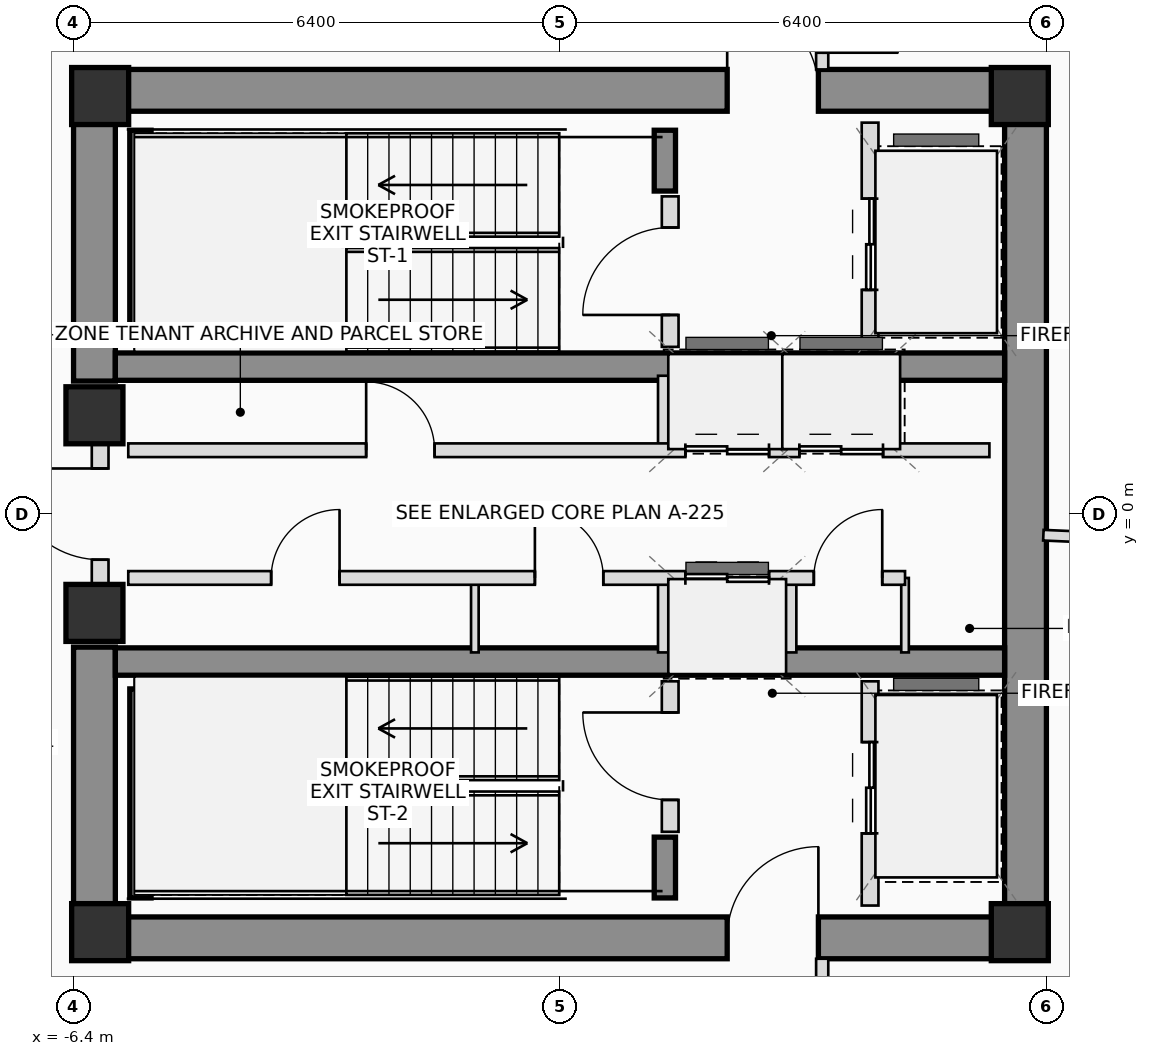
"""IFC4 building model, lengths in metres.
Left out: names, types, materials, properties, quantities, classifications, styles, units other than length and angle.
Written with IfcOpenShell. Run it as: python <this file> out.ifc"""

import sys

from ifc_helpers import new_model, si_unit, direction, frame, frame_2d, origin, origin_2d, place, context, subcontext, project, spatial, rectangle, extrude, source, transform, mapped, element, fill, save


model = new_model("IFC4")
c1 = context("Model", 3, precision=1e-05, world=origin(), true_north=direction((0.0, 1.0)))
c2 = subcontext(c1, "Body", "Model", "MODEL_VIEW")
j1 = project(units=[si_unit("LENGTHUNIT", "METRE"), si_unit("PLANEANGLEUNIT", "RADIAN")], contexts=[c1])
p1 = place(None, origin())
s1 = spatial("IfcSite", under=j1, at=p1, CompositionType="ELEMENT")
p2 = place(p1, origin())
s2 = spatial("IfcBuilding", under=s1, at=p2, CompositionType="ELEMENT")
p3 = place(p2, frame((0.0, 0.0, 274.55)))
s3 = spatial("IfcBuildingStorey", under=s2, at=p3, CompositionType="ELEMENT", Elevation=274.55)
m1 = source(origin(), c2, "Body", "SweptSolid", [
    extrude(rectangle(XDim=0.75, YDim=0.75, at=origin_2d()), origin(), (0.0, 0.0, 1.0), 3.4),
])
for number, where, z_axis, x_axis in (
    (1, (-6.05, -5.5, 0.0), (0.0, 0.0, 1.0), (1.0, 0.0, 0.0)),
    (2, (6.05, -5.5, 0.0), (0.0, 0.0, 1.0), (1.0, 0.0, 0.0)),
    (3, (6.05, 5.5, 0.0), (0.0, 0.0, 1.0), (1.0, 0.0, 0.0)),
    (4, (-6.05, 5.5, 0.0), (0.0, 0.0, 1.0), (1.0, 0.0, 0.0)),
):
    element("IfcColumn", number, at=place(p3, frame(where, z_axis=z_axis, x_axis=x_axis)), inside=s3, PredefinedType="COLUMN", context=c2, shape_type="MappedRepresentation", body=[
        mapped(m1, transform((0.0, 0.0, 0.0), scale=1.0)),
    ])
p4 = place(p3, frame((-6.4, 5.575, 0.0), z_axis=(0.0, 0.0, 1.0), x_axis=(1.0, 0.0, 0.0)))
e5 = element("IfcWall", 5, at=p4, inside=s3, PredefinedType="SHEAR", context=c2, shape_type="SweptSolid", body=[
    extrude(rectangle(XDim=12.8, YDim=0.55, at=frame_2d((6.4, 0.0))), origin(), (0.0, 0.0, 1.0), 3.4),
])
p5 = place(p4, frame((8.6, 0.0, 0.0)))
e6 = element("IfcOpeningElement", 6, at=p5, cuts=e5, PredefinedType="OPENING", context=c2, shape_type="SweptSolid", body=[
    extrude(rectangle(XDim=1.2, YDim=2.2, at=frame_2d((0.6, 1.1))), frame((0.0, 0.285, 0.0), z_axis=(0.0, -1.0, 0.0), x_axis=(1.0, 0.0, 0.0)), (0.0, 0.0, 1.0), 0.57),
])
p6 = place(p3, frame((-6.4, -5.575, 0.0), z_axis=(0.0, 0.0, 1.0), x_axis=(1.0, 0.0, 0.0)))
e7 = element("IfcWall", 7, at=p6, inside=s3, PredefinedType="SHEAR", context=c2, shape_type="SweptSolid", body=[
    extrude(rectangle(XDim=12.8, YDim=0.55, at=frame_2d((6.4, 0.0))), origin(), (0.0, 0.0, 1.0), 3.4),
])
p7 = place(p6, frame((8.6, 0.0, 0.0)))
e8 = element("IfcOpeningElement", 8, at=p7, cuts=e7, PredefinedType="OPENING", context=c2, shape_type="SweptSolid", body=[
    extrude(rectangle(XDim=1.2, YDim=2.2, at=frame_2d((0.6, 1.1))), frame((0.0, 0.285, 0.0), z_axis=(0.0, -1.0, 0.0), x_axis=(1.0, 0.0, 0.0)), (0.0, 0.0, 1.0), 0.57),
])
p8 = place(p3, frame((6.125, -5.3, 0.0), z_axis=(0.0, 0.0, 1.0), x_axis=(0.0, 1.0, 0.0)))
e9 = element("IfcWall", 9, at=p8, inside=s3, PredefinedType="SHEAR", context=c2, shape_type="SweptSolid", body=[
    extrude(rectangle(XDim=10.6, YDim=0.55, at=frame_2d((5.3, 0.0))), origin(), (0.0, 0.0, 1.0), 3.4),
])
for number, where, z_axis, x_axis in (
    (10, (-6.125, -5.3, 0.0), (0.0, 0.0, 1.0), (0.0, 1.0, 0.0)),
    (11, (-6.125, 1.75, 0.0), (0.0, 0.0, 1.0), (0.0, 1.0, 0.0)),
):
    element("IfcWall", number, at=place(p3, frame(where, z_axis=z_axis, x_axis=x_axis)), inside=s3, PredefinedType="SHEAR", context=c2, shape_type="SweptSolid", body=[
        extrude(rectangle(XDim=3.55, YDim=0.55, at=frame_2d((1.775, 0.0))), origin(), (0.0, 0.0, 1.0), 3.4),
    ])
for number, where, z_axis, x_axis in (
    (12, (-5.85, 1.94, 0.0), (0.0, 0.0, 1.0), (1.0, 0.0, 0.0)),
    (13, (-5.85, -1.94, 0.0), (0.0, 0.0, 1.0), (1.0, 0.0, 0.0)),
):
    element("IfcWall", number, at=place(p3, frame(where, z_axis=z_axis, x_axis=x_axis)), inside=s3, PredefinedType="SHEAR", context=c2, shape_type="SweptSolid", body=[
        extrude(rectangle(XDim=11.7, YDim=0.36, at=frame_2d((5.85, 0.0))), origin(), (0.0, 0.0, 1.0), 3.4),
    ])
p9 = place(p3, frame((-5.52, 2.3, 0.0), z_axis=(0.0, 0.0, 1.0), x_axis=(0.0, 1.0, 0.0)))
e14 = element("IfcWall", 14, at=p9, inside=s3, PredefinedType="SHEAR", context=c2, shape_type="SweptSolid", body=[
    extrude(rectangle(XDim=2.75, YDim=0.28, at=frame_2d((1.375, 0.0))), origin(), (0.0, 0.0, 1.0), 3.4),
])
p10 = place(p3, frame((1.38, 4.25, 0.0), z_axis=(0.0, 0.0, 1.0), x_axis=(0.0, 1.0, 0.0)))
e15 = element("IfcWall", 15, at=p10, inside=s3, PredefinedType="SHEAR", context=c2, shape_type="SweptSolid", body=[
    extrude(rectangle(XDim=0.8, YDim=0.28, at=frame_2d((0.4, 0.0))), origin(), (0.0, 0.0, 1.0), 3.4),
])
p11 = place(p3, frame((-5.52, -5.05, 0.0), z_axis=(0.0, 0.0, 1.0), x_axis=(0.0, 1.0, 0.0)))
e16 = element("IfcWall", 16, at=p11, inside=s3, PredefinedType="SHEAR", context=c2, shape_type="SweptSolid", body=[
    extrude(rectangle(XDim=2.75, YDim=0.28, at=frame_2d((1.375, 0.0))), origin(), (0.0, 0.0, 1.0), 3.4),
])
p12 = place(p3, frame((1.38, -5.05, 0.0), z_axis=(0.0, 0.0, 1.0), x_axis=(0.0, 1.0, 0.0)))
e17 = element("IfcWall", 17, at=p12, inside=s3, PredefinedType="SHEAR", context=c2, shape_type="SweptSolid", body=[
    extrude(rectangle(XDim=0.8, YDim=0.28, at=frame_2d((0.4, 0.0))), origin(), (0.0, 0.0, 1.0), 3.4),
])
for number, where, z_axis, x_axis in (
    (18, (-6.125, -1.3, 0.0), (0.0, 0.0, 1.0), (1.0, 0.0, 0.0)),
    (19, (-6.125, 1.3, 0.0), (0.0, 0.0, 1.0), (1.0, 0.0, 0.0)),
):
    element("IfcColumn", number, at=place(p3, frame(where, z_axis=z_axis, x_axis=x_axis)), inside=s3, PredefinedType="COLUMN", context=c2, shape_type="MappedRepresentation", body=[
        mapped(m1, transform((0.0, 0.0, 0.0), scale=1.0)),
    ])
p13 = place(p3, frame((-6.05, -0.95, 0.0), z_axis=(0.0, 0.0, 1.0), x_axis=(0.0, 1.0, 0.0)))
e20 = element("IfcWall", 20, at=p13, inside=s3, PredefinedType="PLUMBINGWALL", context=c2, shape_type="SweptSolid", body=[
    extrude(rectangle(XDim=1.9, YDim=0.22, at=frame_2d((0.95, 0.0))), origin(), (0.0, 0.0, 1.0), 2.18),
])
p14 = place(p13, frame((0.35, 0.0, 0.0)))
e21 = element("IfcOpeningElement", 21, at=p14, cuts=e20, PredefinedType="OPENING", context=c2, shape_type="SweptSolid", body=[
    extrude(rectangle(XDim=1.2, YDim=2.2, at=frame_2d((0.6, 1.1))), frame((0.0, 0.12, 0.0), z_axis=(0.0, -1.0, 0.0), x_axis=(1.0, 0.0, 0.0)), (0.0, 0.0, 1.0), 0.24),
])
p15 = place(p3, frame((1.45, 2.2, 0.0), z_axis=(0.0, 0.0, 1.0), x_axis=(0.0, 1.0, 0.0)))
e22 = element("IfcWall", 22, at=p15, inside=s3, PredefinedType="PLUMBINGWALL", context=c2, shape_type="SweptSolid", body=[
    extrude(rectangle(XDim=1.98, YDim=0.22, at=frame_2d((0.99, 0.0))), origin(), (0.0, 0.0, 1.0), 3.2),
])
p16 = place(p15, frame((0.42, 0.0, 0.0)))
e23 = element("IfcOpeningElement", 23, at=p16, cuts=e22, PredefinedType="OPENING", context=c2, shape_type="SweptSolid", body=[
    extrude(rectangle(XDim=1.15, YDim=2.15, at=frame_2d((0.575, 1.075))), frame((0.0, 0.12, 0.0), z_axis=(0.0, -1.0, 0.0), x_axis=(1.0, 0.0, 0.0)), (0.0, 0.0, 1.0), 0.24),
])
p17 = place(p3, frame((4.08, 2.2, 0.0), z_axis=(0.0, 0.0, 1.0), x_axis=(0.0, 1.0, 0.0)))
e24 = element("IfcWall", 24, at=p17, inside=s3, PredefinedType="PLUMBINGWALL", context=c2, shape_type="SweptSolid", body=[
    extrude(rectangle(XDim=2.95, YDim=0.22, at=frame_2d((1.475, 0.0))), origin(), (0.0, 0.0, 1.0), 3.2),
])
p18 = place(p17, frame((0.75, 0.0, 0.0)))
e25 = element("IfcOpeningElement", 25, at=p18, cuts=e24, PredefinedType="OPENING", context=c2, shape_type="SweptSolid", body=[
    extrude(rectangle(XDim=1.2, YDim=2.25, at=frame_2d((0.6, 1.125))), frame((0.0, 0.12, 0.0), z_axis=(0.0, -1.0, 0.0), x_axis=(1.0, 0.0, 0.0)), (0.0, 0.0, 1.0), 0.24),
])
p19 = place(p3, frame((1.45, -4.18, 0.0), z_axis=(0.0, 0.0, 1.0), x_axis=(0.0, 1.0, 0.0)))
e26 = element("IfcWall", 26, at=p19, inside=s3, PredefinedType="PLUMBINGWALL", context=c2, shape_type="SweptSolid", body=[
    extrude(rectangle(XDim=1.98, YDim=0.22, at=frame_2d((0.99, 0.0))), origin(), (0.0, 0.0, 1.0), 3.2),
])
p20 = place(p19, frame((0.42, 0.0, 0.0)))
e27 = element("IfcOpeningElement", 27, at=p20, cuts=e26, PredefinedType="OPENING", context=c2, shape_type="SweptSolid", body=[
    extrude(rectangle(XDim=1.15, YDim=2.15, at=frame_2d((0.575, 1.075))), frame((0.0, 0.12, 0.0), z_axis=(0.0, -1.0, 0.0), x_axis=(1.0, 0.0, 0.0)), (0.0, 0.0, 1.0), 0.24),
])
p21 = place(p3, frame((4.08, -5.15, 0.0), z_axis=(0.0, 0.0, 1.0), x_axis=(0.0, 1.0, 0.0)))
e28 = element("IfcWall", 28, at=p21, inside=s3, PredefinedType="PLUMBINGWALL", context=c2, shape_type="SweptSolid", body=[
    extrude(rectangle(XDim=2.95, YDim=0.22, at=frame_2d((1.475, 0.0))), origin(), (0.0, 0.0, 1.0), 3.2),
])
p22 = place(p21, frame((0.95, 0.0, 0.0)))
e29 = element("IfcOpeningElement", 29, at=p22, cuts=e28, PredefinedType="OPENING", context=c2, shape_type="SweptSolid", body=[
    extrude(rectangle(XDim=1.2, YDim=2.25, at=frame_2d((0.6, 1.125))), frame((0.0, 0.12, 0.0), z_axis=(0.0, -1.0, 0.0), x_axis=(1.0, 0.0, 0.0)), (0.0, 0.0, 1.0), 0.24),
])
p23 = place(p3, frame((-1.12, -1.82, 0.0), z_axis=(0.0, 0.0, 1.0), x_axis=(0.0, 1.0, 0.0)))
e30 = element("IfcWall", 30, at=p23, inside=s3, PredefinedType="PARTITIONING", context=c2, shape_type="SweptSolid", body=[
    extrude(rectangle(XDim=0.98, YDim=0.1, at=frame_2d((0.49, 0.0))), origin(), (0.0, 0.0, 1.0), 3.2),
])
for number, where, z_axis, x_axis in (
    (31, (1.38, 0.84, 0.0), (0.0, 0.0, 1.0), (0.0, 1.0, 0.0)),
    (32, (1.38, -1.82, 0.0), (0.0, 0.0, 1.0), (0.0, 1.0, 0.0)),
    (33, (3.02, 0.84, 0.0), (0.0, 0.0, 1.0), (0.0, 1.0, 0.0)),
    (34, (4.38, 0.84, 0.0), (0.0, 0.0, 1.0), (0.0, 1.0, 0.0)),
    (35, (3.02, -1.82, 0.0), (0.0, 0.0, 1.0), (0.0, 1.0, 0.0)),
):
    element("IfcWall", number, at=place(p3, frame(where, z_axis=z_axis, x_axis=x_axis)), inside=s3, PredefinedType="PLUMBINGWALL", context=c2, shape_type="SweptSolid", body=[
        extrude(rectangle(XDim=0.98, YDim=0.18, at=frame_2d((0.49, 0.0))), origin(), (0.0, 0.0, 1.0), 3.2),
    ])
p24 = place(p3, frame((4.54, -1.82, 0.0), z_axis=(0.0, 0.0, 1.0), x_axis=(0.0, 1.0, 0.0)))
e36 = element("IfcWall", 36, at=p24, inside=s3, PredefinedType="PARTITIONING", context=c2, shape_type="SweptSolid", body=[
    extrude(rectangle(XDim=0.98, YDim=0.1, at=frame_2d((0.49, 0.0))), origin(), (0.0, 0.0, 1.0), 3.2),
])
p25 = place(p3, frame((-5.68, 0.84, 0.0), z_axis=(0.0, 0.0, 1.0), x_axis=(1.0, 0.0, 0.0)))
e37 = element("IfcWall", 37, at=p25, inside=s3, PredefinedType="PLUMBINGWALL", context=c2, shape_type="SweptSolid", body=[
    extrude(rectangle(XDim=11.33, YDim=0.18, at=frame_2d((5.665, 0.0))), origin(), (0.0, 0.0, 1.0), 3.2),
])
p26 = place(p25, frame((3.13, 0.0, 0.0)))
e38 = element("IfcOpeningElement", 38, at=p26, cuts=e37, PredefinedType="OPENING", context=c2, shape_type="SweptSolid", body=[
    extrude(rectangle(XDim=0.9, YDim=2.05, at=frame_2d((0.45, 1.025))), frame((0.0, 0.1, 0.0), z_axis=(0.0, -1.0, 0.0), x_axis=(1.0, 0.0, 0.0)), (0.0, 0.0, 1.0), 0.2),
])
p27 = place(p25, frame((7.33, 0.0, 0.0)))
e39 = element("IfcOpeningElement", 39, at=p27, cuts=e37, PredefinedType="OPENING", context=c2, shape_type="SweptSolid", body=[
    extrude(rectangle(XDim=1.1, YDim=2.2, at=frame_2d((0.55, 1.1))), frame((0.0, 0.1, 0.0), z_axis=(0.0, -1.0, 0.0), x_axis=(1.0, 0.0, 0.0)), (0.0, 0.0, 1.0), 0.2),
])
p28 = place(p25, frame((8.83, 0.0, 0.0)))
e40 = element("IfcOpeningElement", 40, at=p28, cuts=e37, PredefinedType="OPENING", context=c2, shape_type="SweptSolid", body=[
    extrude(rectangle(XDim=1.1, YDim=2.2, at=frame_2d((0.55, 1.1))), frame((0.0, 0.1, 0.0), z_axis=(0.0, -1.0, 0.0), x_axis=(1.0, 0.0, 0.0)), (0.0, 0.0, 1.0), 0.2),
])
p29 = place(p3, frame((-5.68, -0.84, 0.0), z_axis=(0.0, 0.0, 1.0), x_axis=(1.0, 0.0, 0.0)))
e41 = element("IfcWall", 41, at=p29, inside=s3, PredefinedType="PLUMBINGWALL", context=c2, shape_type="SweptSolid", body=[
    extrude(rectangle(XDim=10.22, YDim=0.18, at=frame_2d((5.11, 0.0))), origin(), (0.0, 0.0, 1.0), 3.2),
])
p30 = place(p29, frame((1.88, 0.0, 0.0)))
e42 = element("IfcOpeningElement", 42, at=p30, cuts=e41, PredefinedType="OPENING", context=c2, shape_type="SweptSolid", body=[
    extrude(rectangle(XDim=0.9, YDim=2.05, at=frame_2d((0.45, 1.025))), frame((0.0, 0.1, 0.0), z_axis=(0.0, -1.0, 0.0), x_axis=(1.0, 0.0, 0.0)), (0.0, 0.0, 1.0), 0.2),
])
p31 = place(p29, frame((5.35, 0.0, 0.0)))
e43 = element("IfcOpeningElement", 43, at=p31, cuts=e41, PredefinedType="OPENING", context=c2, shape_type="SweptSolid", body=[
    extrude(rectangle(XDim=0.9, YDim=2.05, at=frame_2d((0.45, 1.025))), frame((0.0, 0.1, 0.0), z_axis=(0.0, -1.0, 0.0), x_axis=(1.0, 0.0, 0.0)), (0.0, 0.0, 1.0), 0.2),
])
p32 = place(p29, frame((7.33, 0.0, 0.0)))
e44 = element("IfcOpeningElement", 44, at=p32, cuts=e41, PredefinedType="OPENING", context=c2, shape_type="SweptSolid", body=[
    extrude(rectangle(XDim=1.1, YDim=2.2, at=frame_2d((0.55, 1.1))), frame((0.0, 0.1, 0.0), z_axis=(0.0, -1.0, 0.0), x_axis=(1.0, 0.0, 0.0)), (0.0, 0.0, 1.0), 0.2),
])
p33 = place(p29, frame((9.02, 0.0, 0.0)))
e45 = element("IfcOpeningElement", 45, at=p33, cuts=e41, PredefinedType="OPENING", context=c2, shape_type="SweptSolid", body=[
    extrude(rectangle(XDim=0.9, YDim=2.05, at=frame_2d((0.45, 1.025))), frame((0.0, 0.1, 0.0), z_axis=(0.0, -1.0, 0.0), x_axis=(1.0, 0.0, 0.0)), (0.0, 0.0, 1.0), 0.2),
])
p34 = place(p3, frame((3.45, 7.49, 0.0), z_axis=(0.0, 0.0, 1.0), x_axis=(0.0, -1.0, 0.0)))
e46 = element("IfcWall", 46, at=p34, inside=s3, PredefinedType="PARTITIONING", context=c2, shape_type="SweptSolid", body=[
    extrude(rectangle(XDim=1.64, YDim=0.16, at=frame_2d((0.82, 0.0))), origin(), (0.0, 0.0, 1.0), 2.805),
])
p35 = place(p34, frame((0.42, 0.0, 0.0)))
e47 = element("IfcOpeningElement", 47, at=p35, cuts=e46, PredefinedType="OPENING", context=c2, shape_type="SweptSolid", body=[
    extrude(rectangle(XDim=1.0, YDim=2.25, at=frame_2d((0.5, 1.125))), frame((0.0, 0.09, 0.0), z_axis=(0.0, -1.0, 0.0), x_axis=(1.0, 0.0, 0.0)), (0.0, 0.0, 1.0), 0.18),
])
p36 = place(p3, frame((3.45, -5.85, 0.0), z_axis=(0.0, 0.0, 1.0), x_axis=(0.0, -1.0, 0.0)))
e48 = element("IfcWall", 48, at=p36, inside=s3, PredefinedType="PARTITIONING", context=c2, shape_type="SweptSolid", body=[
    extrude(rectangle(XDim=1.64, YDim=0.16, at=frame_2d((0.82, 0.0))), origin(), (0.0, 0.0, 1.0), 3.2),
])
p37 = place(p36, frame((0.32, 0.0, 0.0)))
e49 = element("IfcOpeningElement", 49, at=p37, cuts=e48, PredefinedType="OPENING", context=c2, shape_type="SweptSolid", body=[
    extrude(rectangle(XDim=1.0, YDim=2.25, at=frame_2d((0.5, 1.125))), frame((0.0, 0.09, 0.0), z_axis=(0.0, -1.0, 0.0), x_axis=(1.0, 0.0, 0.0)), (0.0, 0.0, 1.0), 0.18),
])
p38 = place(p3, frame((6.36, -0.278, 0.0), z_axis=(0.0, 0.0, 1.0), x_axis=(0.999047788643, -0.043629302162, 0.0)))
e50 = element("IfcWall", 50, at=p38, inside=s3, PredefinedType="PARTITIONING", context=c2, shape_type="SweptSolid", body=[
    extrude(rectangle(XDim=11.197, YDim=0.14, at=frame_2d((5.599, 0.0))), origin(), (0.0, 0.0, 1.0), 2.765),
])
p39 = place(p5, origin())
e51 = element("IfcDoor", 51, at=p39, inside=s3, OperationType="SINGLE_SWING_LEFT", PredefinedType="DOOR", context=c2, shape_type="SweptSolid", body=[
    extrude(rectangle(XDim=1.2, YDim=2.2, at=frame_2d((0.6, 1.1))), frame((0.0, 0.025, 0.0), z_axis=(0.0, -1.0, 0.0), x_axis=(1.0, 0.0, 0.0)), (0.0, 0.0, 1.0), 0.05),
])
fill(e6, e51)
p40 = place(p7, origin())
e52 = element("IfcDoor", 52, at=p40, inside=s3, OperationType="SINGLE_SWING_RIGHT", PredefinedType="DOOR", context=c2, shape_type="SweptSolid", body=[
    extrude(rectangle(XDim=1.2, YDim=2.2, at=frame_2d((0.6, 1.1))), frame((0.0, 0.025, 0.0), z_axis=(0.0, -1.0, 0.0), x_axis=(1.0, 0.0, 0.0)), (0.0, 0.0, 1.0), 0.05),
])
fill(e8, e52)
p41 = place(p14, origin())
e53 = element("IfcDoor", 53, at=p41, inside=s3, OperationType="SINGLE_SWING_RIGHT", PredefinedType="DOOR", context=c2, shape_type="SweptSolid", body=[
    extrude(rectangle(XDim=1.2, YDim=2.2, at=frame_2d((0.6, 1.1))), frame((0.0, 0.025, 0.0), z_axis=(0.0, -1.0, 0.0), x_axis=(1.0, 0.0, 0.0)), (0.0, 0.0, 1.0), 0.05),
])
fill(e21, e53)
p42 = place(p16, origin())
e54 = element("IfcDoor", 54, at=p42, inside=s3, OperationType="SINGLE_SWING_LEFT", PredefinedType="DOOR", context=c2, shape_type="SweptSolid", body=[
    extrude(rectangle(XDim=1.15, YDim=2.15, at=frame_2d((0.575, 1.075))), frame((0.0, 0.025, 0.0), z_axis=(0.0, -1.0, 0.0), x_axis=(1.0, 0.0, 0.0)), (0.0, 0.0, 1.0), 0.05),
])
fill(e23, e54)
p43 = place(p18, origin())
e55 = element("IfcDoor", 55, at=p43, inside=s3, OperationType="DOUBLE_DOOR_SLIDING", PredefinedType="DOOR", context=c2, shape_type="SweptSolid", body=[
    extrude(rectangle(XDim=1.2, YDim=2.25, at=frame_2d((0.6, 1.125))), frame((0.0, 0.025, 0.0), z_axis=(0.0, -1.0, 0.0), x_axis=(1.0, 0.0, 0.0)), (0.0, 0.0, 1.0), 0.05),
])
fill(e25, e55)
p44 = place(p20, origin())
e56 = element("IfcDoor", 56, at=p44, inside=s3, OperationType="SINGLE_SWING_RIGHT", PredefinedType="DOOR", context=c2, shape_type="SweptSolid", body=[
    extrude(rectangle(XDim=1.15, YDim=2.15, at=frame_2d((0.575, 1.075))), frame((0.0, 0.025, 0.0), z_axis=(0.0, -1.0, 0.0), x_axis=(1.0, 0.0, 0.0)), (0.0, 0.0, 1.0), 0.05),
])
fill(e27, e56)
p45 = place(p22, origin())
e57 = element("IfcDoor", 57, at=p45, inside=s3, OperationType="DOUBLE_DOOR_SLIDING", PredefinedType="DOOR", context=c2, shape_type="SweptSolid", body=[
    extrude(rectangle(XDim=1.2, YDim=2.25, at=frame_2d((0.6, 1.125))), frame((0.0, 0.025, 0.0), z_axis=(0.0, -1.0, 0.0), x_axis=(1.0, 0.0, 0.0)), (0.0, 0.0, 1.0), 0.05),
])
fill(e29, e57)
p46 = place(p26, origin())
e58 = element("IfcDoor", 58, at=p46, inside=s3, OperationType="SINGLE_SWING_LEFT", PredefinedType="DOOR", context=c2, shape_type="SweptSolid", body=[
    extrude(rectangle(XDim=0.9, YDim=2.05, at=frame_2d((0.45, 1.025))), frame((0.0, 0.025, 0.0), z_axis=(0.0, -1.0, 0.0), x_axis=(1.0, 0.0, 0.0)), (0.0, 0.0, 1.0), 0.05),
])
fill(e38, e58)
p47 = place(p27, origin())
e59 = element("IfcDoor", 59, at=p47, inside=s3, OperationType="DOUBLE_DOOR_SLIDING", PredefinedType="DOOR", context=c2, shape_type="SweptSolid", body=[
    extrude(rectangle(XDim=1.1, YDim=2.2, at=frame_2d((0.55, 1.1))), frame((0.0, 0.025, 0.0), z_axis=(0.0, -1.0, 0.0), x_axis=(1.0, 0.0, 0.0)), (0.0, 0.0, 1.0), 0.05),
])
fill(e39, e59)
p48 = place(p28, origin())
e60 = element("IfcDoor", 60, at=p48, inside=s3, OperationType="DOUBLE_DOOR_SLIDING", PredefinedType="DOOR", context=c2, shape_type="SweptSolid", body=[
    extrude(rectangle(XDim=1.1, YDim=2.2, at=frame_2d((0.55, 1.1))), frame((0.0, 0.025, 0.0), z_axis=(0.0, -1.0, 0.0), x_axis=(1.0, 0.0, 0.0)), (0.0, 0.0, 1.0), 0.05),
])
fill(e40, e60)
p49 = place(p30, origin())
e61 = element("IfcDoor", 61, at=p49, inside=s3, OperationType="SINGLE_SWING_RIGHT", PredefinedType="DOOR", context=c2, shape_type="SweptSolid", body=[
    extrude(rectangle(XDim=0.9, YDim=2.05, at=frame_2d((0.45, 1.025))), frame((0.0, 0.025, 0.0), z_axis=(0.0, -1.0, 0.0), x_axis=(1.0, 0.0, 0.0)), (0.0, 0.0, 1.0), 0.05),
])
fill(e42, e61)
p50 = place(p31, origin())
e62 = element("IfcDoor", 62, at=p50, inside=s3, OperationType="SINGLE_SWING_LEFT", PredefinedType="DOOR", context=c2, shape_type="SweptSolid", body=[
    extrude(rectangle(XDim=0.9, YDim=2.05, at=frame_2d((0.45, 1.025))), frame((0.0, 0.025, 0.0), z_axis=(0.0, -1.0, 0.0), x_axis=(1.0, 0.0, 0.0)), (0.0, 0.0, 1.0), 0.05),
])
fill(e43, e62)
p51 = place(p32, origin())
e63 = element("IfcDoor", 63, at=p51, inside=s3, OperationType="DOUBLE_DOOR_SLIDING", PredefinedType="DOOR", context=c2, shape_type="SweptSolid", body=[
    extrude(rectangle(XDim=1.1, YDim=2.2, at=frame_2d((0.55, 1.1))), frame((0.0, 0.025, 0.0), z_axis=(0.0, -1.0, 0.0), x_axis=(1.0, 0.0, 0.0)), (0.0, 0.0, 1.0), 0.05),
])
fill(e44, e63)
p52 = place(p33, origin())
e64 = element("IfcDoor", 64, at=p52, inside=s3, OperationType="SINGLE_SWING_RIGHT", PredefinedType="DOOR", context=c2, shape_type="SweptSolid", body=[
    extrude(rectangle(XDim=0.9, YDim=2.05, at=frame_2d((0.45, 1.025))), frame((0.0, 0.025, 0.0), z_axis=(0.0, -1.0, 0.0), x_axis=(1.0, 0.0, 0.0)), (0.0, 0.0, 1.0), 0.05),
])
fill(e45, e64)
p53 = place(p35, origin())
e65 = element("IfcDoor", 65, at=p53, inside=s3, OperationType="SINGLE_SWING_RIGHT", PredefinedType="DOOR", context=c2, shape_type="SweptSolid", body=[
    extrude(rectangle(XDim=1.0, YDim=2.25, at=frame_2d((0.5, 1.125))), frame((0.0, 0.025, 0.0), z_axis=(0.0, -1.0, 0.0), x_axis=(1.0, 0.0, 0.0)), (0.0, 0.0, 1.0), 0.05),
])
fill(e47, e65)
save(model, sys.argv[1])
